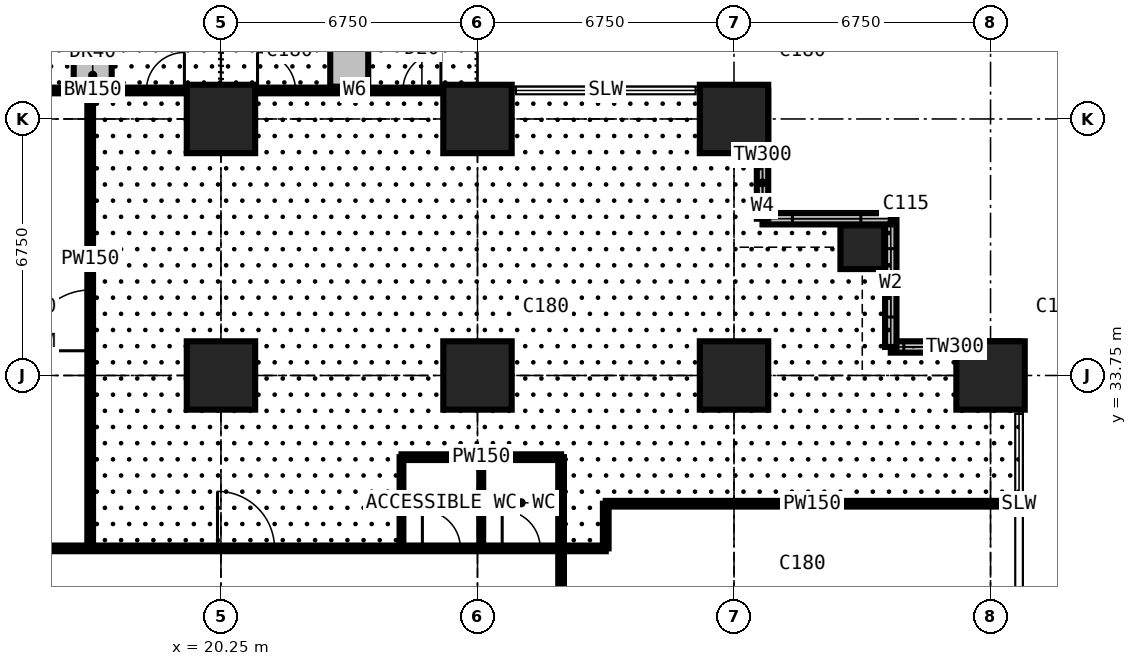
"""IFC4 building model, lengths in metres.
Left out: names, types, materials, properties, quantities, classifications, styles, units other than length and angle.
Written with IfcOpenShell. Run it as: python <this file> out.ifc"""

import sys

from ifc_helpers import new_model, si_unit, direction, frame, frame_2d, origin, origin_2d, place, context, subcontext, project, spatial, rectangle, extrude, element, fill, save


model = new_model("IFC4")
c1 = context("Model", 3, precision=1e-05, world=origin(), true_north=direction((0.0, 1.0)))
c2 = subcontext(c1, "Body", "Model", "MODEL_VIEW")
j1 = project(units=[si_unit("LENGTHUNIT", "METRE"), si_unit("PLANEANGLEUNIT", "RADIAN")], contexts=[c1])
p1 = place(None, origin())
s1 = spatial("IfcSite", under=j1, at=p1, CompositionType="ELEMENT")
p2 = place(p1, origin())
s2 = spatial("IfcBuilding", under=s1, at=p2, CompositionType="ELEMENT")
p3 = place(p2, frame((0.0, 0.0, 46.8)))
s3 = spatial("IfcBuildingStorey", under=s2, at=p3, CompositionType="ELEMENT", Elevation=46.8)
for number, where, z_axis, x_axis in (
    (1, (20.25, 33.75, 0.0), (0.0, 0.0, 1.0), (1.0, 0.0, 0.0)),
    (2, (20.25, 40.5, 0.0), (0.0, 0.0, 1.0), (1.0, 0.0, 0.0)),
    (3, (27.0, 33.75, 0.0), (0.0, 0.0, 1.0), (1.0, 0.0, 0.0)),
    (4, (27.0, 40.5, 0.0), (0.0, 0.0, 1.0), (1.0, 0.0, 0.0)),
    (5, (33.75, 33.75, 0.0), (0.0, 0.0, 1.0), (1.0, 0.0, 0.0)),
    (6, (33.75, 40.5, 0.0), (0.0, 0.0, 1.0), (1.0, 0.0, 0.0)),
):
    element("IfcColumn", number, at=place(p3, frame(where, z_axis=z_axis, x_axis=x_axis)), inside=s3, PredefinedType="COLUMN", context=c2, shape_type="SweptSolid", body=[
        extrude(rectangle(XDim=1.8, YDim=1.8, at=origin_2d()), origin(), (0.0, 0.0, 1.0), 3.6),
    ])
p4 = place(p3, frame((37.125, 37.125, 0.0), z_axis=(0.0, 0.0, 1.0), x_axis=(1.0, 0.0, 0.0)))
e7 = element("IfcColumn", 7, at=p4, inside=s3, PredefinedType="COLUMN", context=c2, shape_type="SweptSolid", body=[
    extrude(rectangle(XDim=1.15, YDim=1.15, at=origin_2d()), origin(), (0.0, 0.0, 1.0), 3.6),
])
p5 = place(p3, frame((40.5, 33.75, 0.0), z_axis=(0.0, 0.0, 1.0), x_axis=(1.0, 0.0, 0.0)))
e8 = element("IfcColumn", 8, at=p5, inside=s3, PredefinedType="COLUMN", context=c2, shape_type="SweptSolid", body=[
    extrude(rectangle(XDim=1.8, YDim=1.8, at=origin_2d()), origin(), (0.0, 0.0, 1.0), 3.6),
])
p6 = place(p3, frame((41.25, 34.5, 0.0), z_axis=(0.0, 0.0, 1.0), x_axis=(-1.0, 0.0, 0.0)))
e9 = element("IfcWall", 9, at=p6, inside=s3, PredefinedType="SOLIDWALL", context=c2, shape_type="SweptSolid", body=[
    extrude(rectangle(XDim=3.375, YDim=0.3, at=frame_2d((1.688, 0.0))), origin(), (0.0, 0.0, 1.0), 3.375),
])
p7 = place(p6, frame((1.833, 0.0, 0.9)))
e10 = element("IfcOpeningElement", 10, at=p7, cuts=e9, PredefinedType="OPENING", context=c2, shape_type="SweptSolid", body=[
    extrude(rectangle(XDim=1.2, YDim=1.8, at=frame_2d((0.6, 0.9))), frame((0.0, 0.16, 0.0), z_axis=(0.0, -1.0, 0.0), x_axis=(1.0, 0.0, 0.0)), (0.0, 0.0, 1.0), 0.32),
])
p8 = place(p3, frame((37.875, 34.5, 0.0), z_axis=(0.0, 0.0, 1.0), x_axis=(0.0, 1.0, 0.0)))
e11 = element("IfcWall", 11, at=p8, inside=s3, PredefinedType="SOLIDWALL", context=c2, shape_type="SweptSolid", body=[
    extrude(rectangle(XDim=3.375, YDim=0.3, at=frame_2d((1.688, 0.0))), origin(), (0.0, 0.0, 1.0), 3.375),
])
p9 = place(p8, frame((0.788, 0.0, 0.6)))
e12 = element("IfcOpeningElement", 12, at=p9, cuts=e11, PredefinedType="OPENING", context=c2, shape_type="SweptSolid", body=[
    extrude(rectangle(XDim=1.8, YDim=2.1, at=frame_2d((0.9, 1.05))), frame((0.0, 0.16, 0.0), z_axis=(0.0, -1.0, 0.0), x_axis=(1.0, 0.0, 0.0)), (0.0, 0.0, 1.0), 0.32),
])
p10 = place(p3, frame((37.875, 37.875, 0.0), z_axis=(0.0, 0.0, 1.0), x_axis=(-1.0, 0.0, 0.0)))
e13 = element("IfcWall", 13, at=p10, inside=s3, PredefinedType="SOLIDWALL", context=c2, shape_type="SweptSolid", body=[
    extrude(rectangle(XDim=3.375, YDim=0.3, at=frame_2d((1.688, 0.0))), origin(), (0.0, 0.0, 1.0), 3.375),
])
p11 = place(p10, frame((0.788, 0.0, 0.6)))
e14 = element("IfcOpeningElement", 14, at=p11, cuts=e13, PredefinedType="OPENING", context=c2, shape_type="SweptSolid", body=[
    extrude(rectangle(XDim=1.8, YDim=2.1, at=frame_2d((0.9, 1.05))), frame((0.0, 0.16, 0.0), z_axis=(0.0, -1.0, 0.0), x_axis=(1.0, 0.0, 0.0)), (0.0, 0.0, 1.0), 0.32),
])
p12 = place(p3, frame((34.5, 37.875, 0.0), z_axis=(0.0, 0.0, 1.0), x_axis=(0.0, 1.0, 0.0)))
e15 = element("IfcWall", 15, at=p12, inside=s3, PredefinedType="SOLIDWALL", context=c2, shape_type="SweptSolid", body=[
    extrude(rectangle(XDim=3.375, YDim=0.3, at=frame_2d((1.688, 0.0))), origin(), (0.0, 0.0, 1.0), 3.375),
])
p13 = place(p12, frame((0.343, 0.0, 0.9)))
e16 = element("IfcOpeningElement", 16, at=p13, cuts=e15, PredefinedType="OPENING", context=c2, shape_type="SweptSolid", body=[
    extrude(rectangle(XDim=1.2, YDim=1.8, at=frame_2d((0.6, 0.9))), frame((0.0, 0.16, 0.0), z_axis=(0.0, -1.0, 0.0), x_axis=(1.0, 0.0, 0.0)), (0.0, 0.0, 1.0), 0.32),
])
p14 = place(p3, frame((13.5, 41.25, 0.0), z_axis=(0.0, 0.0, 1.0), x_axis=(1.0, 0.0, 0.0)))
e17 = element("IfcWall", 17, at=p14, inside=s3, PredefinedType="SOLIDWALL", context=c2, shape_type="SweptSolid", body=[
    extrude(rectangle(XDim=6.75, YDim=0.15, at=frame_2d((3.375, 0.0))), origin(), (0.0, 0.0, 1.0), 3.375),
])
p15 = place(p14, frame((0.962, 0.0, 0.0)))
e18 = element("IfcOpeningElement", 18, at=p15, cuts=e17, PredefinedType="OPENING", context=c2, shape_type="SweptSolid", body=[
    extrude(rectangle(XDim=1.0, YDim=2.2, at=frame_2d((0.5, 1.1))), frame((0.0, 0.085, 0.0), z_axis=(0.0, -1.0, 0.0), x_axis=(1.0, 0.0, 0.0)), (0.0, 0.0, 1.0), 0.17),
])
p16 = place(p14, frame((2.025, 0.0, 0.9)))
e19 = element("IfcOpeningElement", 19, at=p16, cuts=e17, PredefinedType="OPENING", context=c2, shape_type="SweptSolid", body=[
    extrude(rectangle(XDim=1.2, YDim=1.8, at=frame_2d((0.6, 0.9))), frame((0.0, 0.085, 0.0), z_axis=(0.0, -1.0, 0.0), x_axis=(1.0, 0.0, 0.0)), (0.0, 0.0, 1.0), 0.17),
])
p17 = place(p14, frame((4.788, 0.0, 0.0)))
e20 = element("IfcOpeningElement", 20, at=p17, cuts=e17, PredefinedType="OPENING", context=c2, shape_type="SweptSolid", body=[
    extrude(rectangle(XDim=1.0, YDim=2.2, at=frame_2d((0.5, 1.1))), frame((0.0, 0.085, 0.0), z_axis=(0.0, -1.0, 0.0), x_axis=(1.0, 0.0, 0.0)), (0.0, 0.0, 1.0), 0.17),
])
p18 = place(p14, frame((3.525, 0.0, 0.9)))
e21 = element("IfcOpeningElement", 21, at=p18, cuts=e17, PredefinedType="OPENING", context=c2, shape_type="SweptSolid", body=[
    extrude(rectangle(XDim=1.2, YDim=1.8, at=frame_2d((0.6, 0.9))), frame((0.0, 0.085, 0.0), z_axis=(0.0, -1.0, 0.0), x_axis=(1.0, 0.0, 0.0)), (0.0, 0.0, 1.0), 0.17),
])
p19 = place(p3, frame((20.25, 41.25, 0.0), z_axis=(0.0, 0.0, 1.0), x_axis=(1.0, 0.0, 0.0)))
e22 = element("IfcWall", 22, at=p19, inside=s3, PredefinedType="SOLIDWALL", context=c2, shape_type="SweptSolid", body=[
    extrude(rectangle(XDim=6.75, YDim=0.15, at=frame_2d((3.375, 0.0))), origin(), (0.0, 0.0, 1.0), 3.375),
])
p20 = place(p19, frame((0.962, 0.0, 0.0)))
e23 = element("IfcOpeningElement", 23, at=p20, cuts=e22, PredefinedType="OPENING", context=c2, shape_type="SweptSolid", body=[
    extrude(rectangle(XDim=1.0, YDim=2.2, at=frame_2d((0.5, 1.1))), frame((0.0, 0.085, 0.0), z_axis=(0.0, -1.0, 0.0), x_axis=(1.0, 0.0, 0.0)), (0.0, 0.0, 1.0), 0.17),
])
p21 = place(p19, frame((2.025, 0.0, 0.9)))
e24 = element("IfcOpeningElement", 24, at=p21, cuts=e22, PredefinedType="OPENING", context=c2, shape_type="SweptSolid", body=[
    extrude(rectangle(XDim=1.2, YDim=1.8, at=frame_2d((0.6, 0.9))), frame((0.0, 0.085, 0.0), z_axis=(0.0, -1.0, 0.0), x_axis=(1.0, 0.0, 0.0)), (0.0, 0.0, 1.0), 0.17),
])
p22 = place(p19, frame((4.788, 0.0, 0.0)))
e25 = element("IfcOpeningElement", 25, at=p22, cuts=e22, PredefinedType="OPENING", context=c2, shape_type="SweptSolid", body=[
    extrude(rectangle(XDim=1.0, YDim=2.2, at=frame_2d((0.5, 1.1))), frame((0.0, 0.085, 0.0), z_axis=(0.0, -1.0, 0.0), x_axis=(1.0, 0.0, 0.0)), (0.0, 0.0, 1.0), 0.17),
])
p23 = place(p19, frame((3.525, 0.0, 0.9)))
e26 = element("IfcOpeningElement", 26, at=p23, cuts=e22, PredefinedType="OPENING", context=c2, shape_type="SweptSolid", body=[
    extrude(rectangle(XDim=1.2, YDim=1.8, at=frame_2d((0.6, 0.9))), frame((0.0, 0.085, 0.0), z_axis=(0.0, -1.0, 0.0), x_axis=(1.0, 0.0, 0.0)), (0.0, 0.0, 1.0), 0.17),
])
for number, where, z_axis, x_axis in (
    (27, (16.875, 41.35, 0.0), (0.0, 0.0, 1.0), (0.0, 1.0, 0.0)),
    (28, (23.625, 41.35, 0.0), (0.0, 0.0, 1.0), (0.0, 1.0, 0.0)),
):
    element("IfcWall", number, at=place(p3, frame(where, z_axis=z_axis, x_axis=x_axis)), inside=s3, PredefinedType="USERDEFINED", context=c2, shape_type="SweptSolid", body=[
        extrude(rectangle(XDim=2.2, YDim=1.0, at=frame_2d((1.1, 0.0))), origin(), (0.0, 0.0, 1.0), 0.9),
    ])
p24 = place(p3, frame((11.3, 29.2, 0.0), z_axis=(0.0, 0.0, 1.0), x_axis=(1.0, 0.0, 0.0)))
e29 = element("IfcWall", 29, at=p24, inside=s3, PredefinedType="PARTITIONING", context=c2, shape_type="SweptSolid", body=[
    extrude(rectangle(XDim=19.075, YDim=0.15, at=frame_2d((9.538, 0.0))), origin(), (0.0, 0.0, 1.0), 3.375),
])
p25 = place(p24, frame((14.25, 0.0, 0.0)))
e30 = element("IfcOpeningElement", 30, at=p25, cuts=e29, PredefinedType="OPENING", context=c2, shape_type="SweptSolid", body=[
    extrude(rectangle(XDim=1.0, YDim=2.2, at=frame_2d((0.5, 1.1))), frame((0.0, 0.085, 0.0), z_axis=(0.0, -1.0, 0.0), x_axis=(1.0, 0.0, 0.0)), (0.0, 0.0, 1.0), 0.17),
])
p26 = place(p24, frame((16.35, 0.0, 0.0)))
e31 = element("IfcOpeningElement", 31, at=p26, cuts=e29, PredefinedType="OPENING", context=c2, shape_type="SweptSolid", body=[
    extrude(rectangle(XDim=1.0, YDim=2.2, at=frame_2d((0.5, 1.1))), frame((0.0, 0.085, 0.0), z_axis=(0.0, -1.0, 0.0), x_axis=(1.0, 0.0, 0.0)), (0.0, 0.0, 1.0), 0.17),
])
p27 = place(p24, frame((8.859, 0.0, 0.0)))
e32 = element("IfcOpeningElement", 32, at=p27, cuts=e29, PredefinedType="OPENING", context=c2, shape_type="SweptSolid", body=[
    extrude(rectangle(XDim=1.5, YDim=2.2, at=frame_2d((0.75, 1.1))), frame((0.0, 0.085, 0.0), z_axis=(0.0, -1.0, 0.0), x_axis=(1.0, 0.0, 0.0)), (0.0, 0.0, 1.0), 0.17),
])
p28 = place(p3, frame((16.809, 29.2, 0.0), z_axis=(0.0, 0.0, 1.0), x_axis=(0.0, 1.0, 0.0)))
e33 = element("IfcWall", 33, at=p28, inside=s3, PredefinedType="PARTITIONING", context=c2, shape_type="SweptSolid", body=[
    extrude(rectangle(XDim=12.034, YDim=0.15, at=frame_2d((6.017, 0.0))), origin(), (0.0, 0.0, 1.0), 3.375),
])
p29 = place(p28, frame((5.2, 0.0, 0.0)))
e34 = element("IfcOpeningElement", 34, at=p29, cuts=e33, PredefinedType="OPENING", context=c2, shape_type="SweptSolid", body=[
    extrude(rectangle(XDim=1.6, YDim=2.4, at=frame_2d((0.8, 1.2))), frame((0.0, 0.085, 0.0), z_axis=(0.0, -1.0, 0.0), x_axis=(1.0, 0.0, 0.0)), (0.0, 0.0, 1.0), 0.17),
])
p30 = place(p3, frame((25.0, 29.2, 0.0), z_axis=(0.0, 0.0, 1.0), x_axis=(0.0, 1.0, 0.0)))
e35 = element("IfcWall", 35, at=p30, inside=s3, PredefinedType="PARTITIONING", context=c2, shape_type="SweptSolid", body=[
    extrude(rectangle(XDim=2.4, YDim=0.1, at=frame_2d((1.2, 0.0))), origin(), (0.0, 0.0, 1.0), 3.375),
])
p31 = place(p3, frame((25.0, 31.6, 0.0), z_axis=(0.0, 0.0, 1.0), x_axis=(1.0, 0.0, 0.0)))
e36 = element("IfcWall", 36, at=p31, inside=s3, PredefinedType="PARTITIONING", context=c2, shape_type="SweptSolid", body=[
    extrude(rectangle(XDim=4.2, YDim=0.15, at=frame_2d((2.1, 0.0))), origin(), (0.0, 0.0, 1.0), 3.375),
])
p32 = place(p3, frame((27.1, 29.2, 0.0), z_axis=(0.0, 0.0, 1.0), x_axis=(0.0, 1.0, 0.0)))
e37 = element("IfcWall", 37, at=p32, inside=s3, PredefinedType="PARTITIONING", context=c2, shape_type="SweptSolid", body=[
    extrude(rectangle(XDim=2.4, YDim=0.1, at=frame_2d((1.2, 0.0))), origin(), (0.0, 0.0, 1.0), 2.877),
])
p33 = place(p3, frame((29.2, 11.3, 0.0), z_axis=(0.0, 0.0, 1.0), x_axis=(0.0, 1.0, 0.0)))
e38 = element("IfcWall", 38, at=p33, inside=s3, PredefinedType="PARTITIONING", context=c2, shape_type="SweptSolid", body=[
    extrude(rectangle(XDim=20.3, YDim=0.15, at=frame_2d((10.15, 0.0))), origin(), (0.0, 0.0, 1.0), 3.375),
])
p34 = place(p33, frame((8.35, 0.0, 0.0)))
e39 = element("IfcOpeningElement", 39, at=p34, cuts=e38, PredefinedType="OPENING", context=c2, shape_type="SweptSolid", body=[
    extrude(rectangle(XDim=1.2, YDim=2.2, at=frame_2d((0.6, 1.1))), frame((0.0, 0.085, 0.0), z_axis=(0.0, -1.0, 0.0), x_axis=(1.0, 0.0, 0.0)), (0.0, 0.0, 1.0), 0.17),
])
p35 = place(p3, frame((30.375, 29.2, 0.0), z_axis=(0.0, 0.0, 1.0), x_axis=(0.0, 1.0, 0.0)))
e40 = element("IfcWall", 40, at=p35, inside=s3, PredefinedType="PARTITIONING", context=c2, shape_type="SweptSolid", body=[
    extrude(rectangle(XDim=1.175, YDim=0.15, at=frame_2d((0.587, 0.0))), origin(), (0.0, 0.0, 1.0), 3.375),
])
p36 = place(p3, frame((30.375, 30.375, 0.0), z_axis=(0.0, 0.0, 1.0), x_axis=(1.0, 0.0, 0.0)))
e41 = element("IfcWall", 41, at=p36, inside=s3, PredefinedType="PARTITIONING", context=c2, shape_type="SweptSolid", body=[
    extrude(rectangle(XDim=10.859, YDim=0.15, at=frame_2d((5.429, 0.0))), origin(), (0.0, 0.0, 1.0), 3.375),
])
p37 = place(p7, origin())
e42 = element("IfcWindow", 42, at=p37, inside=s3, PartitioningType="SINGLE_PANEL", PredefinedType="WINDOW", context=c2, shape_type="SweptSolid", body=[
    extrude(rectangle(XDim=1.2, YDim=1.8, at=frame_2d((0.6, 0.9))), frame((0.0, 0.03, 0.0), z_axis=(0.0, -1.0, 0.0), x_axis=(1.0, 0.0, 0.0)), (0.0, 0.0, 1.0), 0.06),
])
fill(e10, e42)
p38 = place(p9, origin())
e43 = element("IfcWindow", 43, at=p38, inside=s3, PartitioningType="SINGLE_PANEL", PredefinedType="WINDOW", context=c2, shape_type="SweptSolid", body=[
    extrude(rectangle(XDim=1.8, YDim=2.1, at=frame_2d((0.9, 1.05))), frame((0.0, 0.03, 0.0), z_axis=(0.0, -1.0, 0.0), x_axis=(1.0, 0.0, 0.0)), (0.0, 0.0, 1.0), 0.06),
])
fill(e12, e43)
p39 = place(p11, origin())
e44 = element("IfcWindow", 44, at=p39, inside=s3, PartitioningType="SINGLE_PANEL", PredefinedType="WINDOW", context=c2, shape_type="SweptSolid", body=[
    extrude(rectangle(XDim=1.8, YDim=2.1, at=frame_2d((0.9, 1.05))), frame((0.0, 0.03, 0.0), z_axis=(0.0, -1.0, 0.0), x_axis=(1.0, 0.0, 0.0)), (0.0, 0.0, 1.0), 0.06),
])
fill(e14, e44)
p40 = place(p13, origin())
e45 = element("IfcWindow", 45, at=p40, inside=s3, PartitioningType="SINGLE_PANEL", PredefinedType="WINDOW", context=c2, shape_type="SweptSolid", body=[
    extrude(rectangle(XDim=1.2, YDim=1.8, at=frame_2d((0.6, 0.9))), frame((0.0, 0.03, 0.0), z_axis=(0.0, -1.0, 0.0), x_axis=(1.0, 0.0, 0.0)), (0.0, 0.0, 1.0), 0.06),
])
fill(e16, e45)
p41 = place(p16, origin())
e46 = element("IfcWindow", 46, at=p41, inside=s3, PartitioningType="SINGLE_PANEL", PredefinedType="WINDOW", context=c2, shape_type="SweptSolid", body=[
    extrude(rectangle(XDim=1.2, YDim=1.8, at=frame_2d((0.6, 0.9))), frame((0.0, 0.03, 0.0), z_axis=(0.0, -1.0, 0.0), x_axis=(1.0, 0.0, 0.0)), (0.0, 0.0, 1.0), 0.06),
])
fill(e19, e46)
p42 = place(p17, origin())
e47 = element("IfcDoor", 47, at=p42, inside=s3, OperationType="SINGLE_SWING_RIGHT", PredefinedType="DOOR", context=c2, shape_type="SweptSolid", body=[
    extrude(rectangle(XDim=1.0, YDim=2.2, at=frame_2d((0.5, 1.1))), frame((0.0, 0.025, 0.0), z_axis=(0.0, -1.0, 0.0), x_axis=(1.0, 0.0, 0.0)), (0.0, 0.0, 1.0), 0.05),
])
fill(e20, e47)
p43 = place(p18, origin())
e48 = element("IfcWindow", 48, at=p43, inside=s3, PartitioningType="SINGLE_PANEL", PredefinedType="WINDOW", context=c2, shape_type="SweptSolid", body=[
    extrude(rectangle(XDim=1.2, YDim=1.8, at=frame_2d((0.6, 0.9))), frame((0.0, 0.03, 0.0), z_axis=(0.0, -1.0, 0.0), x_axis=(1.0, 0.0, 0.0)), (0.0, 0.0, 1.0), 0.06),
])
fill(e21, e48)
p44 = place(p20, origin())
e49 = element("IfcDoor", 49, at=p44, inside=s3, OperationType="SINGLE_SWING_LEFT", PredefinedType="DOOR", context=c2, shape_type="SweptSolid", body=[
    extrude(rectangle(XDim=1.0, YDim=2.2, at=frame_2d((0.5, 1.1))), frame((0.0, 0.025, 0.0), z_axis=(0.0, -1.0, 0.0), x_axis=(1.0, 0.0, 0.0)), (0.0, 0.0, 1.0), 0.05),
])
fill(e23, e49)
p45 = place(p21, origin())
e50 = element("IfcWindow", 50, at=p45, inside=s3, PartitioningType="SINGLE_PANEL", PredefinedType="WINDOW", context=c2, shape_type="SweptSolid", body=[
    extrude(rectangle(XDim=1.2, YDim=1.8, at=frame_2d((0.6, 0.9))), frame((0.0, 0.03, 0.0), z_axis=(0.0, -1.0, 0.0), x_axis=(1.0, 0.0, 0.0)), (0.0, 0.0, 1.0), 0.06),
])
fill(e24, e50)
p46 = place(p22, origin())
e51 = element("IfcDoor", 51, at=p46, inside=s3, OperationType="SINGLE_SWING_RIGHT", PredefinedType="DOOR", context=c2, shape_type="SweptSolid", body=[
    extrude(rectangle(XDim=1.0, YDim=2.2, at=frame_2d((0.5, 1.1))), frame((0.0, 0.025, 0.0), z_axis=(0.0, -1.0, 0.0), x_axis=(1.0, 0.0, 0.0)), (0.0, 0.0, 1.0), 0.05),
])
fill(e25, e51)
p47 = place(p23, origin())
e52 = element("IfcWindow", 52, at=p47, inside=s3, PartitioningType="SINGLE_PANEL", PredefinedType="WINDOW", context=c2, shape_type="SweptSolid", body=[
    extrude(rectangle(XDim=1.2, YDim=1.8, at=frame_2d((0.6, 0.9))), frame((0.0, 0.03, 0.0), z_axis=(0.0, -1.0, 0.0), x_axis=(1.0, 0.0, 0.0)), (0.0, 0.0, 1.0), 0.06),
])
fill(e26, e52)
p48 = place(p25, origin())
e53 = element("IfcDoor", 53, at=p48, inside=s3, OperationType="SINGLE_SWING_LEFT", PredefinedType="DOOR", context=c2, shape_type="SweptSolid", body=[
    extrude(rectangle(XDim=1.0, YDim=2.2, at=frame_2d((0.5, 1.1))), frame((0.0, 0.025, 0.0), z_axis=(0.0, -1.0, 0.0), x_axis=(1.0, 0.0, 0.0)), (0.0, 0.0, 1.0), 0.05),
])
fill(e30, e53)
p49 = place(p26, origin())
e54 = element("IfcDoor", 54, at=p49, inside=s3, OperationType="SINGLE_SWING_LEFT", PredefinedType="DOOR", context=c2, shape_type="SweptSolid", body=[
    extrude(rectangle(XDim=1.0, YDim=2.2, at=frame_2d((0.5, 1.1))), frame((0.0, 0.025, 0.0), z_axis=(0.0, -1.0, 0.0), x_axis=(1.0, 0.0, 0.0)), (0.0, 0.0, 1.0), 0.05),
])
fill(e31, e54)
p50 = place(p29, origin())
e55 = element("IfcDoor", 55, at=p50, inside=s3, OperationType="DOUBLE_DOOR_SINGLE_SWING", PredefinedType="DOOR", context=c2, shape_type="SweptSolid", body=[
    extrude(rectangle(XDim=1.6, YDim=2.4, at=frame_2d((0.8, 1.2))), frame((0.0, 0.025, 0.0), z_axis=(0.0, -1.0, 0.0), x_axis=(1.0, 0.0, 0.0)), (0.0, 0.0, 1.0), 0.05),
])
fill(e34, e55)
p51 = place(p27, origin())
e56 = element("IfcDoor", 56, at=p51, inside=s3, OperationType="DOUBLE_DOOR_SINGLE_SWING", PredefinedType="DOOR", context=c2, shape_type="SweptSolid", body=[
    extrude(rectangle(XDim=1.5, YDim=2.2, at=frame_2d((0.75, 1.1))), frame((0.0, 0.025, 0.0), z_axis=(0.0, -1.0, 0.0), x_axis=(1.0, 0.0, 0.0)), (0.0, 0.0, 1.0), 0.05),
])
fill(e32, e56)
save(model, sys.argv[1])
